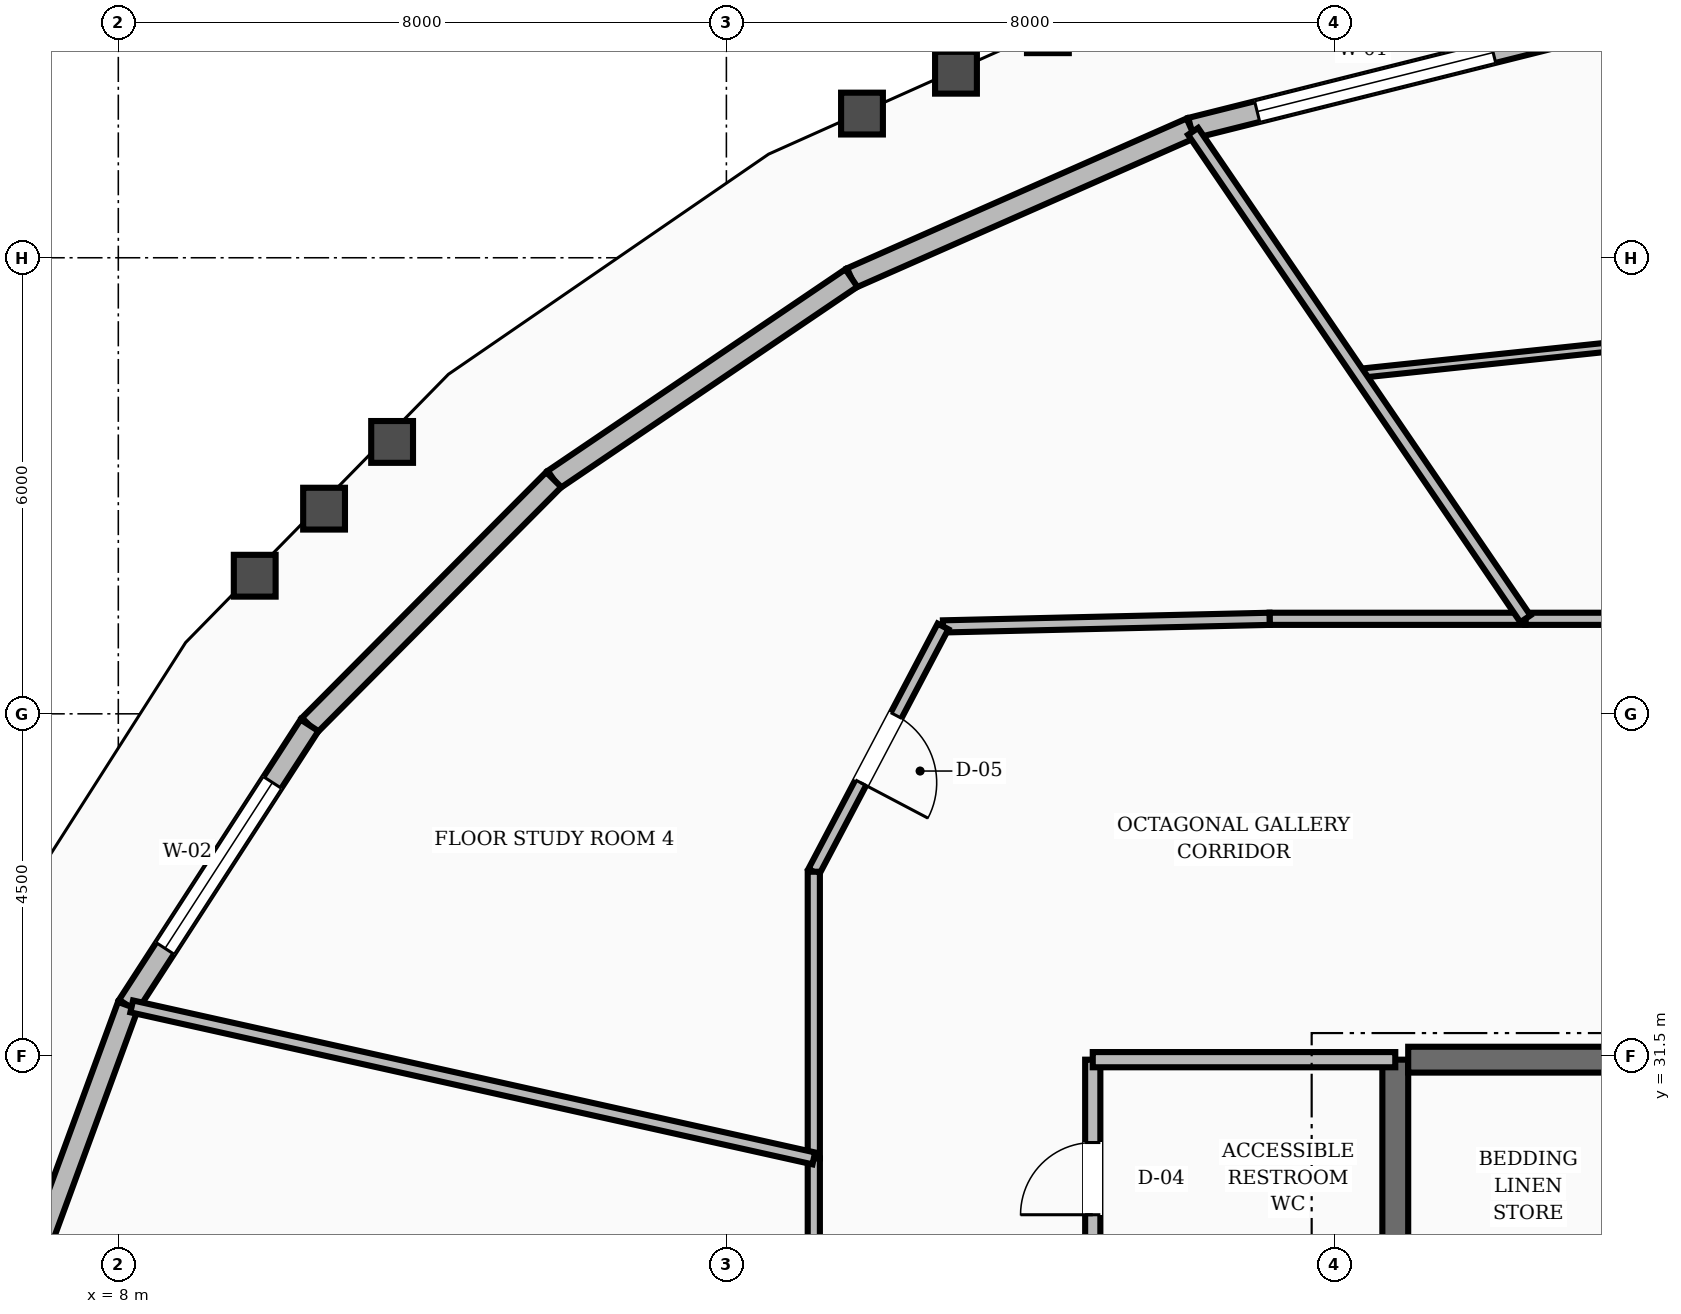
"""IFC4 building model, lengths in metres.
Left out: names, types, materials, properties, quantities, classifications, styles, units other than length and angle.
Written with IfcOpenShell. Run it as: python <this file> out.ifc"""

import sys

from ifc_helpers import new_model, si_unit, direction, frame, frame_2d, origin, place, context, subcontext, project, spatial, rectangle, extrude, element, fill, save


model = new_model("IFC4")
c1 = context("Model", 3, precision=1e-05, world=origin(), true_north=direction((0.0, 1.0)))
c2 = subcontext(c1, "Body", "Model", "MODEL_VIEW")
j1 = project(units=[si_unit("LENGTHUNIT", "METRE"), si_unit("PLANEANGLEUNIT", "RADIAN")], contexts=[c1])
p1 = place(None, origin())
s1 = spatial("IfcSite", under=j1, at=p1, CompositionType="ELEMENT")
p2 = place(p1, origin())
s2 = spatial("IfcBuilding", under=s1, at=p2, CompositionType="ELEMENT")
p3 = place(p2, frame((0.0, 0.0, 178.4)))
s3 = spatial("IfcBuildingStorey", under=s2, at=p3, CompositionType="ELEMENT", Elevation=178.4)
p4 = place(p3, frame((24.8, 25.15, 0.0), z_axis=(0.0, 0.0, 1.0), x_axis=(0.0, 1.0, 0.0)))
e1 = element("IfcWall", 1, at=p4, inside=s3, PredefinedType="SHEAR", context=c2, shape_type="SweptSolid", body=[
    extrude(rectangle(XDim=6.3, YDim=0.34, at=frame_2d((3.15, 0.0))), origin(), (0.0, 0.0, 1.0), 3.6),
])
p5 = place(p3, frame((24.97, 31.45, 0.0), z_axis=(0.0, 0.0, 1.0), x_axis=(1.0, 0.0, 0.0)))
e2 = element("IfcWall", 2, at=p5, inside=s3, PredefinedType="SHEAR", context=c2, shape_type="SweptSolid", body=[
    extrude(rectangle(XDim=3.23, YDim=0.34, at=frame_2d((1.615, 0.0))), origin(), (0.0, 0.0, 1.0), 3.6),
])
p6 = place(p3, frame((26.959, 44.918, 0.0), z_axis=(0.0, 0.0, 1.0), x_axis=(-0.970044703594, -0.242926476593, 0.0)))
e3 = element("IfcWall", 3, at=p6, inside=s3, PredefinedType="STANDARD", context=c2, shape_type="SweptSolid", body=[
    extrude(rectangle(XDim=4.997, YDim=0.28, at=frame_2d((2.499, 0.0))), origin(), (0.0, 0.0, 1.0), 2.82),
])
p7 = place(p6, frame((0.898, 0.0, 0.8)))
e4 = element("IfcOpeningElement", 4, at=p7, cuts=e3, PredefinedType="OPENING", context=c2, shape_type="SweptSolid", body=[
    extrude(rectangle(XDim=3.2, YDim=1.65, at=frame_2d((1.6, 0.825))), frame((0.0, 0.15, 0.0), z_axis=(0.0, -1.0, 0.0), x_axis=(1.0, 0.0, 0.0)), (0.0, 0.0, 1.0), 0.3),
])
p8 = place(p3, frame((22.112, 43.704, 0.0), z_axis=(0.0, 0.0, 1.0), x_axis=(-0.914919430765, -0.40363651372, 0.0)))
e5 = element("IfcWall", 5, at=p8, inside=s3, PredefinedType="STANDARD", context=c2, shape_type="SweptSolid", body=[
    extrude(rectangle(XDim=4.883, YDim=0.28, at=frame_2d((2.441, 0.0))), origin(), (0.0, 0.0, 1.0), 2.82),
])
p9 = place(p3, frame((17.644, 41.733, 0.0), z_axis=(0.0, 0.0, 1.0), x_axis=(-0.827929515697, -0.560832164767, 0.0)))
e6 = element("IfcWall", 6, at=p9, inside=s3, PredefinedType="STANDARD", context=c2, shape_type="SweptSolid", body=[
    extrude(rectangle(XDim=4.729, YDim=0.28, at=frame_2d((2.365, 0.0))), origin(), (0.0, 0.0, 1.0), 2.82),
])
p10 = place(p3, frame((13.729, 39.081, 0.0), z_axis=(0.0, 0.0, 1.0), x_axis=(-0.705095186085, -0.709112669862, 0.0)))
e7 = element("IfcWall", 7, at=p10, inside=s3, PredefinedType="STANDARD", context=c2, shape_type="SweptSolid", body=[
    extrude(rectangle(XDim=4.558, YDim=0.28, at=frame_2d((2.279, 0.0))), origin(), (0.0, 0.0, 1.0), 2.82),
])
p11 = place(p3, frame((10.515, 35.849, 0.0), z_axis=(0.0, 0.0, 1.0), x_axis=(-0.543543905956, -0.839380737388, 0.0)))
e8 = element("IfcWall", 8, at=p11, inside=s3, PredefinedType="STANDARD", context=c2, shape_type="SweptSolid", body=[
    extrude(rectangle(XDim=4.393, YDim=0.28, at=frame_2d((2.196, 0.0))), origin(), (0.0, 0.0, 1.0), 2.82),
])
p12 = place(p11, frame((0.896, 0.0, 0.8)))
e9 = element("IfcOpeningElement", 9, at=p12, cuts=e8, PredefinedType="OPENING", context=c2, shape_type="SweptSolid", body=[
    extrude(rectangle(XDim=2.6, YDim=1.65, at=frame_2d((1.3, 0.825))), frame((0.0, 0.15, 0.0), z_axis=(0.0, -1.0, 0.0), x_axis=(1.0, 0.0, 0.0)), (0.0, 0.0, 1.0), 0.3),
])
p13 = place(p3, frame((8.127, 32.162, 0.0), z_axis=(0.0, 0.0, 1.0), x_axis=(-0.344964732898, -0.93861564714, 0.0)))
e10 = element("IfcWall", 10, at=p13, inside=s3, PredefinedType="STANDARD", context=c2, shape_type="SweptSolid", body=[
    extrude(rectangle(XDim=4.263, YDim=0.28, at=frame_2d((2.131, 0.0))), origin(), (0.0, 0.0, 1.0), 2.82),
])
p14 = place(p3, frame((20.82, 28.32, 0.0), z_axis=(0.0, 0.0, 1.0), x_axis=(0.0, 1.0, 0.0)))
e11 = element("IfcWall", 11, at=p14, inside=s3, PredefinedType="SOLIDWALL", context=c2, shape_type="SweptSolid", body=[
    extrude(rectangle(XDim=3.13, YDim=0.2, at=frame_2d((1.565, 0.0))), origin(), (0.0, 0.0, 1.0), 2.8),
])
p15 = place(p14, frame((1.09, 0.0, 0.0)))
e12 = element("IfcOpeningElement", 12, at=p15, cuts=e11, PredefinedType="OPENING", context=c2, shape_type="SweptSolid", body=[
    extrude(rectangle(XDim=0.95, YDim=2.1, at=frame_2d((0.475, 1.05))), frame((0.0, 0.11, 0.0), z_axis=(0.0, -1.0, 0.0), x_axis=(1.0, 0.0, 0.0)), (0.0, 0.0, 1.0), 0.22),
])
p16 = place(p3, frame((20.82, 31.45, 0.0), z_axis=(0.0, 0.0, 1.0), x_axis=(1.0, 0.0, 0.0)))
e13 = element("IfcWall", 13, at=p16, inside=s3, PredefinedType="SOLIDWALL", context=c2, shape_type="SweptSolid", body=[
    extrude(rectangle(XDim=3.98, YDim=0.2, at=frame_2d((1.99, 0.0))), origin(), (0.0, 0.0, 1.0), 2.8),
])
p17 = place(p3, frame((29.365, 37.25, 0.0), z_axis=(0.0, 0.0, 1.0), x_axis=(-1.0, 0.0, 0.0)))
e14 = element("IfcWall", 14, at=p17, inside=s3, PredefinedType="SOLIDWALL", context=c2, shape_type="SweptSolid", body=[
    extrude(rectangle(XDim=2.853, YDim=0.16, at=frame_2d((1.426, 0.0))), origin(), (0.0, 0.0, 1.0), 2.8),
])
p18 = place(p3, frame((26.512, 37.25, 0.0), z_axis=(0.0, 0.0, 1.0), x_axis=(-1.0, 0.0, 0.0)))
e15 = element("IfcWall", 15, at=p18, inside=s3, PredefinedType="SOLIDWALL", context=c2, shape_type="SweptSolid", body=[
    extrude(rectangle(XDim=3.365, YDim=0.16, at=frame_2d((1.683, 0.0))), origin(), (0.0, 0.0, 1.0), 2.8),
])
p19 = place(p3, frame((23.146, 37.25, 0.0), z_axis=(0.0, 0.0, 1.0), x_axis=(-0.999728709658, -0.023291781507, 0.0)))
e16 = element("IfcWall", 16, at=p19, inside=s3, PredefinedType="SOLIDWALL", context=c2, shape_type="SweptSolid", body=[
    extrude(rectangle(XDim=4.298, YDim=0.16, at=frame_2d((2.149, 0.0))), origin(), (0.0, 0.0, 1.0), 2.8),
])
p20 = place(p3, frame((18.85, 37.15, 0.0), z_axis=(0.0, 0.0, 1.0), x_axis=(-0.466093963429, -0.884735224378, 0.0)))
e17 = element("IfcWall", 17, at=p20, inside=s3, PredefinedType="SOLIDWALL", context=c2, shape_type="SweptSolid", body=[
    extrude(rectangle(XDim=3.648, YDim=0.16, at=frame_2d((1.824, 0.0))), origin(), (0.0, 0.0, 1.0), 2.8),
])
p21 = place(p20, frame((1.324, 0.0, 0.0)))
e18 = element("IfcOpeningElement", 18, at=p21, cuts=e17, PredefinedType="OPENING", context=c2, shape_type="SweptSolid", body=[
    extrude(rectangle(XDim=1.0, YDim=2.1, at=frame_2d((0.5, 1.05))), frame((0.0, 0.09, 0.0), z_axis=(0.0, -1.0, 0.0), x_axis=(1.0, 0.0, 0.0)), (0.0, 0.0, 1.0), 0.18),
])
p22 = place(p3, frame((17.15, 33.923, 0.0), z_axis=(0.0, 0.0, 1.0), x_axis=(0.0, -1.0, 0.0)))
e19 = element("IfcWall", 19, at=p22, inside=s3, PredefinedType="SOLIDWALL", context=c2, shape_type="SweptSolid", body=[
    extrude(rectangle(XDim=3.771, YDim=0.16, at=frame_2d((1.886, 0.0))), origin(), (0.0, 0.0, 1.0), 2.8),
])
p23 = place(p3, frame((17.15, 30.151, 0.0), z_axis=(0.0, 0.0, 1.0), x_axis=(0.0, -1.0, 0.0)))
e20 = element("IfcWall", 20, at=p23, inside=s3, PredefinedType="SOLIDWALL", context=c2, shape_type="SweptSolid", body=[
    extrude(rectangle(XDim=3.197, YDim=0.16, at=frame_2d((1.599, 0.0))), origin(), (0.0, 0.0, 1.0), 2.8),
])
p24 = place(p3, frame((32.0, 41.289, 0.0), z_axis=(0.0, 0.0, 1.0), x_axis=(-0.994475302954, -0.104970814106, 0.0)))
e21 = element("IfcWall", 21, at=p24, inside=s3, PredefinedType="PARTITIONING", context=c2, shape_type="SweptSolid", body=[
    extrude(rectangle(XDim=7.731, YDim=0.12, at=frame_2d((3.865, 0.0))), origin(), (0.0, 0.0, 1.0), 2.8),
])
p25 = place(p24, frame((3.39, 0.0, 0.0)))
e22 = element("IfcOpeningElement", 22, at=p25, cuts=e21, PredefinedType="OPENING", context=c2, shape_type="SweptSolid", body=[
    extrude(rectangle(XDim=0.95, YDim=2.1, at=frame_2d((0.475, 1.05))), frame((0.0, 0.07, 0.0), z_axis=(0.0, -1.0, 0.0), x_axis=(1.0, 0.0, 0.0)), (0.0, 0.0, 1.0), 0.14),
])
p26 = place(p3, frame((26.512, 37.25, 0.0), z_axis=(0.0, 0.0, 1.0), x_axis=(-0.563272403626, 0.826271262548, 0.0)))
e23 = element("IfcWall", 23, at=p26, inside=s3, PredefinedType="SOLIDWALL", context=c2, shape_type="SweptSolid", body=[
    extrude(rectangle(XDim=7.761, YDim=0.16, at=frame_2d((3.881, 0.0))), origin(), (0.0, 0.0, 1.0), 2.8),
])
p27 = place(p3, frame((17.15, 30.151, 0.0), z_axis=(0.0, 0.0, 1.0), x_axis=(-0.976057547945, 0.217512443552, 0.0)))
e24 = element("IfcWall", 24, at=p27, inside=s3, PredefinedType="SOLIDWALL", context=c2, shape_type="SweptSolid", body=[
    extrude(rectangle(XDim=9.194, YDim=0.16, at=frame_2d((4.597, 0.0))), origin(), (0.0, 0.0, 1.0), 2.8),
])
p28 = place(p7, origin())
e25 = element("IfcWindow", 25, at=p28, inside=s3, PartitioningType="SINGLE_PANEL", PredefinedType="WINDOW", context=c2, shape_type="SweptSolid", body=[
    extrude(rectangle(XDim=3.2, YDim=1.65, at=frame_2d((1.6, 0.825))), frame((0.0, 0.03, 0.0), z_axis=(0.0, -1.0, 0.0), x_axis=(1.0, 0.0, 0.0)), (0.0, 0.0, 1.0), 0.06),
])
fill(e4, e25)
p29 = place(p12, origin())
e26 = element("IfcWindow", 26, at=p29, inside=s3, PartitioningType="SINGLE_PANEL", PredefinedType="WINDOW", context=c2, shape_type="SweptSolid", body=[
    extrude(rectangle(XDim=2.6, YDim=1.65, at=frame_2d((1.3, 0.825))), frame((0.0, 0.03, 0.0), z_axis=(0.0, -1.0, 0.0), x_axis=(1.0, 0.0, 0.0)), (0.0, 0.0, 1.0), 0.06),
])
fill(e9, e26)
p30 = place(p15, origin())
e27 = element("IfcDoor", 27, at=p30, inside=s3, OperationType="SINGLE_SWING_LEFT", PredefinedType="DOOR", context=c2, shape_type="SweptSolid", body=[
    extrude(rectangle(XDim=0.95, YDim=2.1, at=frame_2d((0.475, 1.05))), frame((0.0, 0.025, 0.0), z_axis=(0.0, -1.0, 0.0), x_axis=(1.0, 0.0, 0.0)), (0.0, 0.0, 1.0), 0.05),
])
fill(e12, e27)
p31 = place(p21, origin())
e28 = element("IfcDoor", 28, at=p31, inside=s3, OperationType="SINGLE_SWING_RIGHT", PredefinedType="DOOR", context=c2, shape_type="SweptSolid", body=[
    extrude(rectangle(XDim=1.0, YDim=2.1, at=frame_2d((0.5, 1.05))), frame((0.0, 0.025, 0.0), z_axis=(0.0, -1.0, 0.0), x_axis=(1.0, 0.0, 0.0)), (0.0, 0.0, 1.0), 0.05),
])
fill(e18, e28)
save(model, sys.argv[1])
